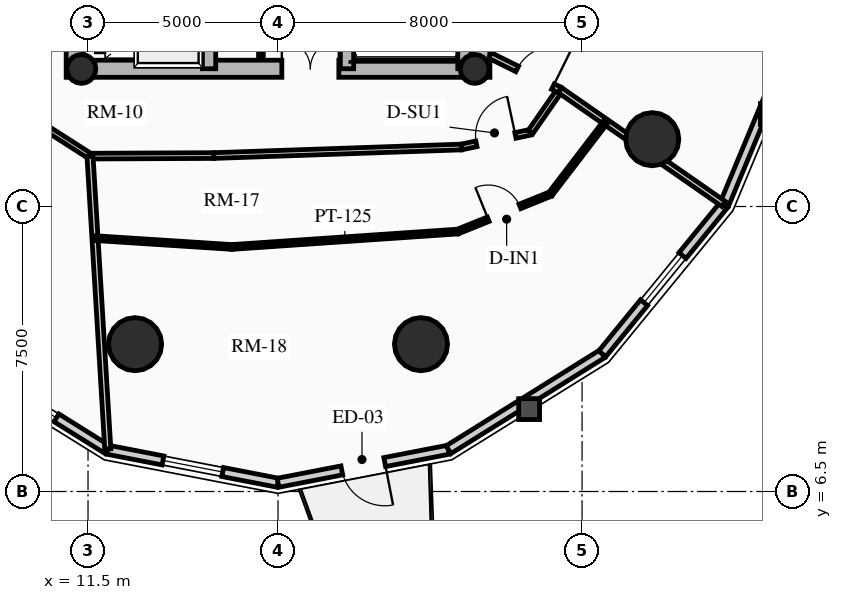
"""IFC4 building model, lengths in metres.
Left out: names, types, materials, properties, quantities, classifications, styles, units other than length and angle.
Written with IfcOpenShell. Run it as: python <this file> out.ifc"""

import sys

from ifc_helpers import new_model, si_unit, direction, frame, frame_2d, origin, origin_2d, place, context, subcontext, project, spatial, rectangle, circle, hollow_circle, extrude, source, transform, mapped, element, fill, save


model = new_model("IFC4")
c1 = context("Model", 3, precision=1e-05, world=origin(), true_north=direction((0.0, 1.0)))
c2 = subcontext(c1, "Body", "Model", "MODEL_VIEW")
j1 = project(units=[si_unit("LENGTHUNIT", "METRE"), si_unit("PLANEANGLEUNIT", "RADIAN")], contexts=[c1])
p1 = place(None, origin())
s1 = spatial("IfcSite", under=j1, at=p1, CompositionType="ELEMENT")
p2 = place(p1, origin())
s2 = spatial("IfcBuilding", under=s1, at=p2, CompositionType="ELEMENT")
p3 = place(p2, frame((0.0, 0.0, 144.04)))
s3 = spatial("IfcBuildingStorey", under=s2, at=p3, CompositionType="ELEMENT", Elevation=144.04)
for number, where, z_axis, x_axis in (
    (1, (11.15, 17.4, 0.0), (0.0, 0.0, 1.0), (0.0, 1.0, 0.0)),
    (2, (21.85, 17.4, 0.0), (0.0, 0.0, 1.0), (0.0, 1.0, 0.0)),
):
    element("IfcWall", number, at=place(p3, frame(where, z_axis=z_axis, x_axis=x_axis)), inside=s3, PredefinedType="SHEAR", context=c2, shape_type="SweptSolid", body=[
        extrude(rectangle(XDim=14.2, YDim=0.45, at=frame_2d((7.1, 0.0))), origin(), (0.0, 0.0, 1.0), 3.06),
    ])
p4 = place(p3, frame((11.15, 17.625, 0.0), z_axis=(0.0, 0.0, 1.0), x_axis=(1.0, 0.0, 0.0)))
e3 = element("IfcWall", 3, at=p4, inside=s3, PredefinedType="SHEAR", context=c2, shape_type="SweptSolid", body=[
    extrude(rectangle(XDim=10.7, YDim=0.45, at=frame_2d((5.35, 0.0))), origin(), (0.0, 0.0, 1.0), 3.06),
])
m1 = source(origin(), c2, "Body", "SweptSolid", [
    extrude(rectangle(XDim=1.5, YDim=2.02, at=frame_2d((0.75, 1.01))), frame((0.0, 0.235, 0.0), z_axis=(0.0, -1.0, 0.0), x_axis=(1.0, 0.0, 0.0)), (0.0, 0.0, 1.0), 0.47),
])
p5 = place(p4, frame((5.45, 0.0, 0.0)))
e4 = element("IfcOpeningElement", 4, at=p5, cuts=e3, PredefinedType="OPENING", context=c2, shape_type="MappedRepresentation", body=[
    mapped(m1, transform((0.0, 0.0, 0.0), x_axis=(1.0, 0.0, 0.0), y_axis=(0.0, 1.0, 0.0), z_axis=(0.0, 0.0, 1.0), scale=1.0)),
])
p6 = place(p3, frame((14.685, 17.625, 0.0), z_axis=(0.0, 0.0, 1.0), x_axis=(0.0, 1.0, 0.0)))
e5 = element("IfcWall", 5, at=p6, inside=s3, PredefinedType="SHEAR", context=c2, shape_type="SweptSolid", body=[
    extrude(rectangle(XDim=13.75, YDim=0.35, at=frame_2d((6.875, 0.0))), origin(), (0.0, 0.0, 1.0), 3.06),
])
m2 = source(origin(), c2, "Body", "SweptSolid", [
    extrude(rectangle(XDim=1.1, YDim=2.015, at=frame_2d((0.55, 1.007))), frame((0.0, 0.185, 0.0), z_axis=(0.0, -1.0, 0.0), x_axis=(1.0, 0.0, 0.0)), (0.0, 0.0, 1.0), 0.37),
])
p7 = place(p6, frame((4.875, 0.0, 0.0)))
e6 = element("IfcOpeningElement", 6, at=p7, cuts=e5, PredefinedType="OPENING", context=c2, shape_type="MappedRepresentation", body=[
    mapped(m2, transform((0.0, 0.0, 0.0), x_axis=(1.0, 0.0, 0.0), y_axis=(0.0, 1.0, 0.0), z_axis=(0.0, 0.0, 1.0), scale=1.0)),
])
p8 = place(p6, frame((0.65, 0.0, 0.0)))
e7 = element("IfcOpeningElement", 7, at=p8, cuts=e5, PredefinedType="OPENING", context=c2, shape_type="MappedRepresentation", body=[
    mapped(m2, transform((0.0, 0.0, 0.0), x_axis=(1.0, 0.0, 0.0), y_axis=(0.0, 1.0, 0.0), z_axis=(0.0, 0.0, 1.0), scale=1.0)),
])
p9 = place(p6, frame((2.65, 0.0, 0.0)))
e8 = element("IfcOpeningElement", 8, at=p9, cuts=e5, PredefinedType="OPENING", context=c2, shape_type="MappedRepresentation", body=[
    mapped(m2, transform((0.0, 0.0, 0.0), x_axis=(1.0, 0.0, 0.0), y_axis=(0.0, 1.0, 0.0), z_axis=(0.0, 0.0, 1.0), scale=1.0)),
])
m3 = source(origin(), c2, "Body", "SweptSolid", [
    extrude(rectangle(XDim=1.15, YDim=2.02, at=frame_2d((0.575, 1.01))), frame((0.0, 0.185, 0.0), z_axis=(0.0, -1.0, 0.0), x_axis=(1.0, 0.0, 0.0)), (0.0, 0.0, 1.0), 0.37),
])
p10 = place(p6, frame((7.295, 0.0, 0.0)))
e9 = element("IfcOpeningElement", 9, at=p10, cuts=e5, PredefinedType="OPENING", context=c2, shape_type="MappedRepresentation", body=[
    mapped(m3, transform((0.0, 0.0, 0.0), x_axis=(1.0, 0.0, 0.0), y_axis=(0.0, 1.0, 0.0), z_axis=(0.0, 0.0, 1.0), scale=1.0)),
])
p11 = place(p3, frame((18.315, 17.625, 0.0), z_axis=(0.0, 0.0, 1.0), x_axis=(0.0, 1.0, 0.0)))
e10 = element("IfcWall", 10, at=p11, inside=s3, PredefinedType="SHEAR", context=c2, shape_type="SweptSolid", body=[
    extrude(rectangle(XDim=9.625, YDim=0.35, at=frame_2d((4.812, 0.0))), origin(), (0.0, 0.0, 1.0), 3.06),
])
p12 = place(p11, frame((5.305, 0.0, 0.0)))
e11 = element("IfcOpeningElement", 11, at=p12, cuts=e10, PredefinedType="OPENING", context=c2, shape_type="MappedRepresentation", body=[
    mapped(m3, transform((0.0, 0.0, 0.0), x_axis=(1.0, 0.0, 0.0), y_axis=(0.0, 1.0, 0.0), z_axis=(0.0, 0.0, 1.0), scale=1.0)),
])
p13 = place(p3, frame((21.405, 17.625, 0.0), z_axis=(0.0, 0.0, 1.0), x_axis=(0.0, 1.0, 0.0)))
e12 = element("IfcWall", 12, at=p13, inside=s3, PredefinedType="SHEAR", context=c2, shape_type="SweptSolid", body=[
    extrude(rectangle(XDim=6.72, YDim=0.35, at=frame_2d((3.36, 0.0))), origin(), (0.0, 0.0, 1.0), 3.06),
])
for number, where, z_axis, x_axis in (
    (13, (11.325, 17.62, 0.0), (0.0, 0.0, 1.0), (1.0, 0.0, 0.0)),
    (14, (21.675, 17.62, 0.0), (0.0, 0.0, 1.0), (1.0, 0.0, 0.0)),
):
    element("IfcColumn", number, at=place(p3, frame(where, z_axis=z_axis, x_axis=x_axis)), inside=s3, PredefinedType="COLUMN", context=c2, shape_type="SweptSolid", body=[
        extrude(hollow_circle(Radius=0.38, WallThickness=0.032, at=origin_2d()), origin(), (0.0, 0.0, 1.0), 3.06),
    ])
for number, where, z_axis, x_axis in (
    (15, (12.739, 10.377, 0.0), (0.0, 0.0, 1.0), (1.0, 0.0, 0.0)),
    (16, (20.261, 10.377, 0.0), (0.0, 0.0, 1.0), (1.0, 0.0, 0.0)),
    (17, (26.347, 15.771, 0.0), (0.0, 0.0, 1.0), (1.0, 0.0, 0.0)),
):
    element("IfcColumn", number, at=place(p3, frame(where, z_axis=z_axis, x_axis=x_axis)), inside=s3, PredefinedType="USERDEFINED", context=c2, shape_type="SweptSolid", body=[
        extrude(circle(Radius=0.7, at=origin_2d()), origin(), (0.0, 0.0, 1.0), 3.06),
    ])
p14 = place(p3, frame((12.015, 7.6, 0.0), z_axis=(0.0, 0.0, 1.0), x_axis=(-0.848452391194, 0.529271707044, 0.0)))
e18 = element("IfcWall", 18, at=p14, inside=s3, PredefinedType="SOLIDWALL", context=c2, shape_type="SweptSolid", body=[
    extrude(rectangle(XDim=4.769, YDim=0.24, at=frame_2d((2.385, 0.0))), origin(), (0.0, 0.0, 1.0), 2.229),
])
m4 = source(origin(), c2, "Body", "SweptSolid", [
    extrude(rectangle(XDim=1.6, YDim=1.3, at=frame_2d((0.8, 0.65))), frame((0.0, 0.13, 0.0), z_axis=(0.0, -1.0, 0.0), x_axis=(1.0, 0.0, 0.0)), (0.0, 0.0, 1.0), 0.26),
])
p15 = place(p14, frame((1.585, 0.0, 0.65)))
e19 = element("IfcOpeningElement", 19, at=p15, cuts=e18, PredefinedType="OPENING", context=c2, shape_type="MappedRepresentation", body=[
    mapped(m4, transform((0.0, 0.0, 0.0), x_axis=(1.0, 0.0, 0.0), y_axis=(0.0, 1.0, 0.0), z_axis=(0.0, 0.0, 1.0), scale=1.0)),
])
p16 = place(p3, frame((16.5, 6.73, 0.0), z_axis=(0.0, 0.0, 1.0), x_axis=(-0.981718699963, 0.190337579429, 0.0)))
e20 = element("IfcWall", 20, at=p16, inside=s3, PredefinedType="SOLIDWALL", context=c2, shape_type="SweptSolid", body=[
    extrude(rectangle(XDim=4.569, YDim=0.24, at=frame_2d((2.284, 0.0))), origin(), (0.0, 0.0, 1.0), 2.229),
])
p17 = place(p16, frame((1.484, 0.0, 0.65)))
e21 = element("IfcOpeningElement", 21, at=p17, cuts=e20, PredefinedType="OPENING", context=c2, shape_type="MappedRepresentation", body=[
    mapped(m4, transform((0.0, 0.0, 0.0), x_axis=(1.0, 0.0, 0.0), y_axis=(0.0, 1.0, 0.0), z_axis=(0.0, 0.0, 1.0), scale=1.0)),
])
p18 = place(p3, frame((20.985, 7.6, 0.0), z_axis=(0.0, 0.0, 1.0), x_axis=(-0.981718699963, -0.190337579429, 0.0)))
e22 = element("IfcWall", 22, at=p18, inside=s3, PredefinedType="SOLIDWALL", context=c2, shape_type="SweptSolid", body=[
    extrude(rectangle(XDim=4.569, YDim=0.24, at=frame_2d((2.284, 0.0))), origin(), (0.0, 0.0, 1.0), 2.229),
])
m5 = source(origin(), c2, "Body", "SweptSolid", [
    extrude(rectangle(XDim=1.15, YDim=2.005, at=frame_2d((0.575, 1.002))), frame((0.0, 0.13, 0.0), z_axis=(0.0, -1.0, 0.0), x_axis=(1.0, 0.0, 0.0)), (0.0, 0.0, 1.0), 0.26),
])
p19 = place(p18, frame((1.709, 0.0, 0.0)))
e23 = element("IfcOpeningElement", 23, at=p19, cuts=e22, PredefinedType="OPENING", context=c2, shape_type="MappedRepresentation", body=[
    mapped(m5, transform((0.0, 0.0, 0.0), x_axis=(1.0, 0.0, 0.0), y_axis=(0.0, 1.0, 0.0), z_axis=(0.0, 0.0, 1.0), scale=1.0)),
])
p20 = place(p3, frame((25.032, 10.124, 0.0), z_axis=(0.0, 0.0, 1.0), x_axis=(-0.848452391194, -0.529271707044, 0.0)))
e24 = element("IfcWall", 24, at=p20, inside=s3, PredefinedType="SOLIDWALL", context=c2, shape_type="SweptSolid", body=[
    extrude(rectangle(XDim=4.769, YDim=0.24, at=frame_2d((2.385, 0.0))), origin(), (0.0, 0.0, 1.0), 2.229),
])
p21 = place(p3, frame((28.243, 14.055, 0.0), z_axis=(0.0, 0.0, 1.0), x_axis=(-0.632598524901, -0.774479894053, 0.0)))
e25 = element("IfcWall", 25, at=p21, inside=s3, PredefinedType="SOLIDWALL", context=c2, shape_type="SweptSolid", body=[
    extrude(rectangle(XDim=5.076, YDim=0.24, at=frame_2d((2.538, 0.0))), origin(), (0.0, 0.0, 1.0), 2.229),
])
p22 = place(p21, frame((1.738, 0.0, 0.65)))
e26 = element("IfcOpeningElement", 26, at=p22, cuts=e25, PredefinedType="OPENING", context=c2, shape_type="MappedRepresentation", body=[
    mapped(m4, transform((0.0, 0.0, 0.0), x_axis=(1.0, 0.0, 0.0), y_axis=(0.0, 1.0, 0.0), z_axis=(0.0, 0.0, 1.0), scale=1.0)),
])
p23 = place(p3, frame((30.305, 19.009, 0.0), z_axis=(0.0, 0.0, 1.0), x_axis=(-0.384259959969, -0.923224936386, 0.0)))
e27 = element("IfcWall", 27, at=p23, inside=s3, PredefinedType="SOLIDWALL", context=c2, shape_type="SweptSolid", body=[
    extrude(rectangle(XDim=5.365, YDim=0.24, at=frame_2d((2.683, 0.0))), origin(), (0.0, 0.0, 1.0), 2.229),
])
p24 = place(p3, frame((16.05, 17.92, 0.0), z_axis=(0.0, 0.0, 1.0), x_axis=(0.0, 1.0, 0.0)))
e28 = element("IfcWall", 28, at=p24, inside=s3, PredefinedType="PARTITIONING", context=c2, shape_type="SweptSolid", body=[
    extrude(rectangle(XDim=3.08, YDim=0.125, at=frame_2d((1.54, 0.0))), origin(), (0.0, 0.0, 1.0), 2.705),
])
m6 = source(origin(), c2, "Body", "SweptSolid", [
    extrude(rectangle(XDim=0.9, YDim=2.005, at=frame_2d((0.45, 1.002))), frame((0.0, 0.073, 0.0), z_axis=(0.0, -1.0, 0.0), x_axis=(1.0, 0.0, 0.0)), (0.0, 0.0, 1.0), 0.145),
])
p25 = place(p24, frame((1.05, 0.0, 0.0)))
e29 = element("IfcOpeningElement", 29, at=p25, cuts=e28, PredefinedType="OPENING", context=c2, shape_type="MappedRepresentation", body=[
    mapped(m6, transform((0.0, 0.0, 0.0), x_axis=(1.0, 0.0, 0.0), y_axis=(0.0, 1.0, 0.0), z_axis=(0.0, 0.0, 1.0), scale=1.0)),
])
p26 = place(p3, frame((10.237, 16.168, 0.0), z_axis=(0.0, 0.0, 1.0), x_axis=(0.842061223587, -0.53938195718, 0.0)))
e30 = element("IfcWall", 30, at=p26, inside=s3, PredefinedType="PARTITIONING", context=c2, shape_type="SweptSolid", body=[
    extrude(rectangle(XDim=1.562, YDim=0.15, at=frame_2d((0.781, 0.0))), origin(), (0.0, 0.0, 1.0), 2.275),
])
p27 = place(p3, frame((11.552, 15.326, 0.0), z_axis=(0.0, 0.0, 1.0), x_axis=(0.999989573465, 0.004566504266, 0.0)))
e31 = element("IfcWall", 31, at=p27, inside=s3, PredefinedType="PARTITIONING", context=c2, shape_type="SweptSolid", body=[
    extrude(rectangle(XDim=3.261, YDim=0.15, at=frame_2d((1.631, 0.0))), origin(), (0.0, 0.0, 1.0), 2.275),
])
p28 = place(p3, frame((14.813, 15.341, 0.0), z_axis=(0.0, 0.0, 1.0), x_axis=(0.999402077819, 0.034575813105, 0.0)))
e32 = element("IfcWall", 32, at=p28, inside=s3, PredefinedType="PARTITIONING", context=c2, shape_type="SweptSolid", body=[
    extrude(rectangle(XDim=6.517, YDim=0.15, at=frame_2d((3.259, 0.0))), origin(), (0.0, 0.0, 1.0), 2.275),
])
p29 = place(p3, frame((21.326, 15.566, 0.0), z_axis=(0.0, 0.0, 1.0), x_axis=(0.977908238308, 0.209034632176, 0.0)))
e33 = element("IfcWall", 33, at=p29, inside=s3, PredefinedType="PARTITIONING", context=c2, shape_type="SweptSolid", body=[
    extrude(rectangle(XDim=1.855, YDim=0.15, at=frame_2d((0.927, 0.0))), origin(), (0.0, 0.0, 1.0), 2.275),
])
m7 = source(origin(), c2, "Body", "SweptSolid", [
    extrude(rectangle(XDim=1.05, YDim=2.015, at=frame_2d((0.525, 1.007))), frame((0.0, 0.085, 0.0), z_axis=(0.0, -1.0, 0.0), x_axis=(1.0, 0.0, 0.0)), (0.0, 0.0, 1.0), 0.17),
])
p30 = place(p29, frame((0.402, 0.0, 0.0)))
e34 = element("IfcOpeningElement", 34, at=p30, cuts=e33, PredefinedType="OPENING", context=c2, shape_type="MappedRepresentation", body=[
    mapped(m7, transform((0.0, 0.0, 0.0), x_axis=(1.0, 0.0, 0.0), y_axis=(0.0, 1.0, 0.0), z_axis=(0.0, 0.0, 1.0), scale=1.0)),
])
p31 = place(p3, frame((23.14, 15.954, 0.0), z_axis=(0.0, 0.0, 1.0), x_axis=(0.570699895117, 0.821158711647, 0.0)))
e35 = element("IfcWall", 35, at=p31, inside=s3, PredefinedType="PARTITIONING", context=c2, shape_type="SweptSolid", body=[
    extrude(rectangle(XDim=1.354, YDim=0.15, at=frame_2d((0.677, 0.0))), origin(), (0.0, 0.0, 1.0), 2.275),
])
p32 = place(p3, frame((11.552, 15.326, 0.0), z_axis=(0.0, 0.0, 1.0), x_axis=(0.060740403573, -0.998153597085, 0.0)))
e36 = element("IfcWall", 36, at=p32, inside=s3, PredefinedType="PARTITIONING", context=c2, shape_type="SweptSolid", body=[
    extrude(rectangle(XDim=7.721, YDim=0.16, at=frame_2d((3.861, 0.0))), origin(), (0.0, 0.0, 1.0), 2.229),
])
p33 = place(p3, frame((23.913, 17.065, 0.0), z_axis=(0.0, 0.0, 1.0), x_axis=(0.821126775727, -0.570745843773, 0.0)))
e37 = element("IfcWall", 37, at=p33, inside=s3, PredefinedType="PARTITIONING", context=c2, shape_type="SweptSolid", body=[
    extrude(rectangle(XDim=5.254, YDim=0.16, at=frame_2d((2.627, 0.0))), origin(), (0.0, 0.0, 1.0), 2.229),
])
p34 = place(p3, frame((22.075, 17.975, 0.0), z_axis=(0.0, 0.0, 1.0), x_axis=(0.89622947115, -0.443590729212, 0.0)))
e38 = element("IfcWall", 38, at=p34, inside=s3, PredefinedType="PARTITIONING", context=c2, shape_type="SweptSolid", body=[
    extrude(rectangle(XDim=2.051, YDim=0.16, at=frame_2d((1.025, 0.0))), origin(), (0.0, 0.0, 1.0), 2.275),
])
m8 = source(origin(), c2, "Body", "SweptSolid", [
    extrude(rectangle(XDim=1.05, YDim=2.015, at=frame_2d((0.525, 1.007))), frame((0.0, 0.09, 0.0), z_axis=(0.0, -1.0, 0.0), x_axis=(1.0, 0.0, 0.0)), (0.0, 0.0, 1.0), 0.18),
])
p35 = place(p34, frame((0.801, 0.0, 0.0)))
e39 = element("IfcOpeningElement", 39, at=p35, cuts=e38, PredefinedType="OPENING", context=c2, shape_type="MappedRepresentation", body=[
    mapped(m8, transform((0.0, 0.0, 0.0), x_axis=(1.0, 0.0, 0.0), y_axis=(0.0, 1.0, 0.0), z_axis=(0.0, 0.0, 1.0), scale=1.0)),
])
p36 = place(p3, frame((11.683, 13.168, 0.0), z_axis=(0.0, 0.0, 1.0), x_axis=(0.997925028615, -0.06438662333, 0.0)))
e40 = element("IfcWall", 40, at=p36, inside=s3, PredefinedType="PARTITIONING", context=c2, shape_type="SweptSolid", body=[
    extrude(rectangle(XDim=3.61, YDim=0.125, at=frame_2d((1.805, 0.0))), origin(), (0.0, 0.0, 1.0), 2.275),
])
p37 = place(p3, frame((15.285, 12.935, 0.0), z_axis=(0.0, 0.0, 1.0), x_axis=(0.997680594374, 0.068069314736, 0.0)))
e41 = element("IfcWall", 41, at=p37, inside=s3, PredefinedType="PARTITIONING", context=c2, shape_type="SweptSolid", body=[
    extrude(rectangle(XDim=5.958, YDim=0.125, at=frame_2d((2.979, 0.0))), origin(), (0.0, 0.0, 1.0), 2.275),
])
p38 = place(p3, frame((21.229, 13.341, 0.0), z_axis=(0.0, 0.0, 1.0), x_axis=(0.927177333678, 0.374622732778, 0.0)))
e42 = element("IfcWall", 42, at=p38, inside=s3, PredefinedType="PARTITIONING", context=c2, shape_type="SweptSolid", body=[
    extrude(rectangle(XDim=2.629, YDim=0.125, at=frame_2d((1.314, 0.0))), origin(), (0.0, 0.0, 1.0), 2.275),
])
p39 = place(p38, frame((0.865, 0.0, 0.0)))
e43 = element("IfcOpeningElement", 43, at=p39, cuts=e42, PredefinedType="OPENING", context=c2, shape_type="MappedRepresentation", body=[
    mapped(m6, transform((0.0, 0.0, 0.0), x_axis=(1.0, 0.0, 0.0), y_axis=(0.0, 1.0, 0.0), z_axis=(0.0, 0.0, 1.0), scale=1.0)),
])
p40 = place(p3, frame((23.667, 14.326, 0.0), z_axis=(0.0, 0.0, 1.0), x_axis=(0.60779089321, 0.794097116309, 0.0)))
e44 = element("IfcWall", 44, at=p40, inside=s3, PredefinedType="PARTITIONING", context=c2, shape_type="SweptSolid", body=[
    extrude(rectangle(XDim=2.393, YDim=0.125, at=frame_2d((1.196, 0.0))), origin(), (0.0, 0.0, 1.0), 2.275),
])
m9 = source(origin(), c2, "Body", "SweptSolid", [
    extrude(rectangle(XDim=1.6, YDim=1.3, at=frame_2d((0.8, 0.65))), frame((0.0, 0.03, 0.0), z_axis=(0.0, -1.0, 0.0), x_axis=(1.0, 0.0, 0.0)), (0.0, 0.0, 1.0), 0.06),
])
p41 = place(p15, origin())
e45 = element("IfcWindow", 45, at=p41, inside=s3, PartitioningType="SINGLE_PANEL", PredefinedType="WINDOW", context=c2, shape_type="MappedRepresentation", body=[
    mapped(m9, transform((0.0, 0.0, 0.0), x_axis=(1.0, 0.0, 0.0), y_axis=(0.0, 1.0, 0.0), z_axis=(0.0, 0.0, 1.0), scale=1.0)),
])
fill(e19, e45)
p42 = place(p17, origin())
e46 = element("IfcWindow", 46, at=p42, inside=s3, PartitioningType="SINGLE_PANEL", PredefinedType="WINDOW", context=c2, shape_type="MappedRepresentation", body=[
    mapped(m9, transform((0.0, 0.0, 0.0), x_axis=(1.0, 0.0, 0.0), y_axis=(0.0, 1.0, 0.0), z_axis=(0.0, 0.0, 1.0), scale=1.0)),
])
fill(e21, e46)
m10 = source(origin(), c2, "Body", "SweptSolid", [
    extrude(rectangle(XDim=1.15, YDim=2.005, at=frame_2d((0.575, 1.002))), frame((0.0, 0.025, 0.0), z_axis=(0.0, -1.0, 0.0), x_axis=(1.0, 0.0, 0.0)), (0.0, 0.0, 1.0), 0.05),
])
p43 = place(p19, origin())
e47 = element("IfcDoor", 47, at=p43, inside=s3, OperationType="SINGLE_SWING_LEFT", PredefinedType="DOOR", context=c2, shape_type="MappedRepresentation", body=[
    mapped(m10, transform((0.0, 0.0, 0.0), x_axis=(1.0, 0.0, 0.0), y_axis=(0.0, 1.0, 0.0), z_axis=(0.0, 0.0, 1.0), scale=1.0)),
])
fill(e23, e47)
p44 = place(p22, origin())
e48 = element("IfcWindow", 48, at=p44, inside=s3, PartitioningType="SINGLE_PANEL", PredefinedType="WINDOW", context=c2, shape_type="MappedRepresentation", body=[
    mapped(m9, transform((0.0, 0.0, 0.0), x_axis=(1.0, 0.0, 0.0), y_axis=(0.0, 1.0, 0.0), z_axis=(0.0, 0.0, 1.0), scale=1.0)),
])
fill(e26, e48)
m11 = source(origin(), c2, "Body", "SweptSolid", [
    extrude(rectangle(XDim=1.5, YDim=2.02, at=frame_2d((0.75, 1.01))), frame((0.0, 0.025, 0.0), z_axis=(0.0, -1.0, 0.0), x_axis=(1.0, 0.0, 0.0)), (0.0, 0.0, 1.0), 0.05),
])
p45 = place(p5, origin())
e49 = element("IfcDoor", 49, at=p45, inside=s3, OperationType="DOUBLE_DOOR_SINGLE_SWING", PredefinedType="DOOR", context=c2, shape_type="MappedRepresentation", body=[
    mapped(m11, transform((0.0, 0.0, 0.0), x_axis=(1.0, 0.0, 0.0), y_axis=(0.0, 1.0, 0.0), z_axis=(0.0, 0.0, 1.0), scale=1.0)),
])
fill(e4, e49)
m12 = source(origin(), c2, "Body", "SweptSolid", [
    extrude(rectangle(XDim=1.05, YDim=2.015, at=frame_2d((0.525, 1.007))), frame((0.0, 0.025, 0.0), z_axis=(0.0, -1.0, 0.0), x_axis=(1.0, 0.0, 0.0)), (0.0, 0.0, 1.0), 0.05),
])
p46 = place(p35, origin())
e50 = element("IfcDoor", 50, at=p46, inside=s3, OperationType="SINGLE_SWING_RIGHT", PredefinedType="DOOR", context=c2, shape_type="MappedRepresentation", body=[
    mapped(m12, transform((0.0, 0.0, 0.0), x_axis=(1.0, 0.0, 0.0), y_axis=(0.0, 1.0, 0.0), z_axis=(0.0, 0.0, 1.0), scale=1.0)),
])
fill(e39, e50)
p47 = place(p30, origin())
e51 = element("IfcDoor", 51, at=p47, inside=s3, OperationType="SINGLE_SWING_RIGHT", PredefinedType="DOOR", context=c2, shape_type="MappedRepresentation", body=[
    mapped(m12, transform((0.0, 0.0, 0.0), x_axis=(1.0, 0.0, 0.0), y_axis=(0.0, 1.0, 0.0), z_axis=(0.0, 0.0, 1.0), scale=1.0)),
])
fill(e34, e51)
m13 = source(origin(), c2, "Body", "SweptSolid", [
    extrude(rectangle(XDim=0.9, YDim=2.005, at=frame_2d((0.45, 1.002))), frame((0.0, 0.025, 0.0), z_axis=(0.0, -1.0, 0.0), x_axis=(1.0, 0.0, 0.0)), (0.0, 0.0, 1.0), 0.05),
])
p48 = place(p39, origin())
e52 = element("IfcDoor", 52, at=p48, inside=s3, OperationType="SINGLE_SWING_LEFT", PredefinedType="DOOR", context=c2, shape_type="MappedRepresentation", body=[
    mapped(m13, transform((0.0, 0.0, 0.0), x_axis=(1.0, 0.0, 0.0), y_axis=(0.0, 1.0, 0.0), z_axis=(0.0, 0.0, 1.0), scale=1.0)),
])
fill(e43, e52)
save(model, sys.argv[1])
